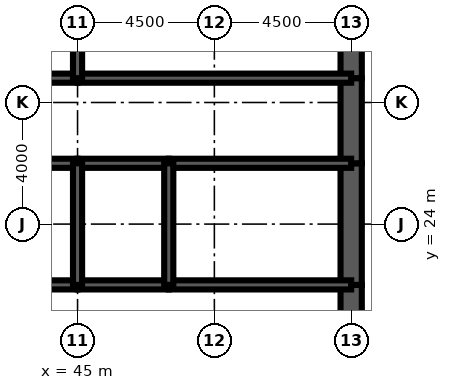
"""IFC4 building model, lengths in metres.
Left out: names, types, materials, properties, quantities, classifications, styles, units other than length and angle.
Written with IfcOpenShell. Run it as: python <this file> out.ifc"""

import sys

from ifc_helpers import new_model, si_unit, direction, frame, frame_2d, origin, place, context, subcontext, project, spatial, rectangle, extrude, element, fill, save


model = new_model("IFC4")
c1 = context("Model", 3, precision=1e-05, world=origin(), true_north=direction((0.0, 1.0)))
c2 = subcontext(c1, "Body", "Model", "MODEL_VIEW")
j1 = project(units=[si_unit("LENGTHUNIT", "METRE"), si_unit("PLANEANGLEUNIT", "RADIAN")], contexts=[c1])
p1 = place(None, origin())
s1 = spatial("IfcSite", under=j1, at=p1, CompositionType="ELEMENT")
p2 = place(p1, origin())
s2 = spatial("IfcBuilding", under=s1, at=p2, CompositionType="ELEMENT")
p3 = place(p2, frame((0.0, 0.0, 287.9)))
s3 = spatial("IfcBuildingStorey", under=s2, at=p3, CompositionType="ELEMENT", Elevation=287.9)
p4 = place(p3, frame((54.0, 19.2, 0.0), z_axis=(0.0, 0.0, 1.0), x_axis=(0.0, 1.0, 0.0)))
e1 = element("IfcWall", 1, at=p4, inside=s3, PredefinedType="SHEAR", context=c2, shape_type="SweptSolid", body=[
    extrude(rectangle(XDim=2.8, YDim=0.7, at=frame_2d((1.4, 0.0))), origin(), (0.0, 0.0, 1.0), 4.2),
])
p5 = place(p4, frame((0.4, 0.0, 0.0)))
e2 = element("IfcOpeningElement", 2, at=p5, cuts=e1, PredefinedType="OPENING", context=c2, shape_type="SweptSolid", body=[
    extrude(rectangle(XDim=1.8, YDim=2.1, at=frame_2d((0.9, 1.05))), frame((0.0, 0.36, 0.0), z_axis=(0.0, -1.0, 0.0), x_axis=(1.0, 0.0, 0.0)), (0.0, 0.0, 1.0), 0.72),
])
p6 = place(p3, frame((54.0, 22.0, 0.0), z_axis=(0.0, 0.0, 1.0), x_axis=(0.0, 1.0, 0.0)))
e3 = element("IfcWall", 3, at=p6, inside=s3, PredefinedType="SHEAR", context=c2, shape_type="SweptSolid", body=[
    extrude(rectangle(XDim=4.0, YDim=0.7, at=frame_2d((2.0, 0.0))), origin(), (0.0, 0.0, 1.0), 4.2),
])
p7 = place(p3, frame((54.0, 26.0, 0.0), z_axis=(0.0, 0.0, 1.0), x_axis=(0.0, 1.0, 0.0)))
e4 = element("IfcWall", 4, at=p7, inside=s3, PredefinedType="SHEAR", context=c2, shape_type="SweptSolid", body=[
    extrude(rectangle(XDim=2.8, YDim=0.7, at=frame_2d((1.4, 0.0))), origin(), (0.0, 0.0, 1.0), 4.2),
])
p8 = place(p7, frame((0.6, 0.0, 0.0)))
e5 = element("IfcOpeningElement", 5, at=p8, cuts=e4, PredefinedType="OPENING", context=c2, shape_type="SweptSolid", body=[
    extrude(rectangle(XDim=1.8, YDim=2.1, at=frame_2d((0.9, 1.05))), frame((0.0, 0.36, 0.0), z_axis=(0.0, -1.0, 0.0), x_axis=(1.0, 0.0, 0.0)), (0.0, 0.0, 1.0), 0.72),
])
p9 = place(p3, frame((54.0, 28.8, 0.0), z_axis=(0.0, 0.0, 1.0), x_axis=(0.0, 1.0, 0.0)))
e6 = element("IfcWall", 6, at=p9, inside=s3, PredefinedType="SHEAR", context=c2, shape_type="SweptSolid", body=[
    extrude(rectangle(XDim=3.2, YDim=0.7, at=frame_2d((1.6, 0.0))), origin(), (0.0, 0.0, 1.0), 4.2),
])
p10 = place(p3, frame((42.0, 28.8, 0.0), z_axis=(0.0, 0.0, 1.0), x_axis=(1.0, 0.0, 0.0)))
e7 = element("IfcWall", 7, at=p10, inside=s3, PredefinedType="SOLIDWALL", context=c2, shape_type="SweptSolid", body=[
    extrude(rectangle(XDim=3.0, YDim=0.3, at=frame_2d((1.5, 0.0))), origin(), (0.0, 0.0, 1.0), 4.2),
])
p11 = place(p10, frame((0.95, 0.0, 0.0)))
e8 = element("IfcOpeningElement", 8, at=p11, cuts=e7, PredefinedType="OPENING", context=c2, shape_type="SweptSolid", body=[
    extrude(rectangle(XDim=1.1, YDim=2.2, at=frame_2d((0.55, 1.1))), frame((0.0, 0.16, 0.0), z_axis=(0.0, -1.0, 0.0), x_axis=(1.0, 0.0, 0.0)), (0.0, 0.0, 1.0), 0.32),
])
p12 = place(p3, frame((45.0, 28.8, 0.0), z_axis=(0.0, 0.0, 1.0), x_axis=(1.0, 0.0, 0.0)))
e9 = element("IfcWall", 9, at=p12, inside=s3, PredefinedType="SOLIDWALL", context=c2, shape_type="SweptSolid", body=[
    extrude(rectangle(XDim=9.0, YDim=0.3, at=frame_2d((4.5, 0.0))), origin(), (0.0, 0.0, 1.0), 4.2),
])
p13 = place(p12, frame((7.35, 0.0, 0.0)))
e10 = element("IfcOpeningElement", 10, at=p13, cuts=e9, PredefinedType="OPENING", context=c2, shape_type="SweptSolid", body=[
    extrude(rectangle(XDim=1.0, YDim=2.1, at=frame_2d((0.5, 1.05))), frame((0.0, 0.16, 0.0), z_axis=(0.0, -1.0, 0.0), x_axis=(1.0, 0.0, 0.0)), (0.0, 0.0, 1.0), 0.32),
])
p14 = place(p3, frame((36.0, 22.0, 0.0), z_axis=(0.0, 0.0, 1.0), x_axis=(1.0, 0.0, 0.0)))
e11 = element("IfcWall", 11, at=p14, inside=s3, PredefinedType="SOLIDWALL", context=c2, shape_type="SweptSolid", body=[
    extrude(rectangle(XDim=9.0, YDim=0.3, at=frame_2d((4.5, 0.0))), origin(), (0.0, 0.0, 1.0), 4.2),
])
p15 = place(p14, frame((4.0, 0.0, 0.0)))
e12 = element("IfcOpeningElement", 12, at=p15, cuts=e11, PredefinedType="OPENING", context=c2, shape_type="SweptSolid", body=[
    extrude(rectangle(XDim=1.0, YDim=2.1, at=frame_2d((0.5, 1.05))), frame((0.0, 0.16, 0.0), z_axis=(0.0, -1.0, 0.0), x_axis=(1.0, 0.0, 0.0)), (0.0, 0.0, 1.0), 0.32),
])
p16 = place(p3, frame((45.0, 22.0, 0.0), z_axis=(0.0, 0.0, 1.0), x_axis=(1.0, 0.0, 0.0)))
e13 = element("IfcWall", 13, at=p16, inside=s3, PredefinedType="SOLIDWALL", context=c2, shape_type="SweptSolid", body=[
    extrude(rectangle(XDim=3.0, YDim=0.3, at=frame_2d((1.5, 0.0))), origin(), (0.0, 0.0, 1.0), 4.2),
])
p17 = place(p16, frame((1.0, 0.0, 0.0)))
e14 = element("IfcOpeningElement", 14, at=p17, cuts=e13, PredefinedType="OPENING", context=c2, shape_type="SweptSolid", body=[
    extrude(rectangle(XDim=1.0, YDim=2.1, at=frame_2d((0.5, 1.05))), frame((0.0, 0.16, 0.0), z_axis=(0.0, -1.0, 0.0), x_axis=(1.0, 0.0, 0.0)), (0.0, 0.0, 1.0), 0.32),
])
p18 = place(p3, frame((48.0, 22.0, 0.0), z_axis=(0.0, 0.0, 1.0), x_axis=(1.0, 0.0, 0.0)))
e15 = element("IfcWall", 15, at=p18, inside=s3, PredefinedType="SOLIDWALL", context=c2, shape_type="SweptSolid", body=[
    extrude(rectangle(XDim=6.0, YDim=0.3, at=frame_2d((3.0, 0.0))), origin(), (0.0, 0.0, 1.0), 4.2),
])
p19 = place(p18, frame((2.0, 0.0, 0.0)))
e16 = element("IfcOpeningElement", 16, at=p19, cuts=e15, PredefinedType="OPENING", context=c2, shape_type="SweptSolid", body=[
    extrude(rectangle(XDim=1.0, YDim=2.1, at=frame_2d((0.5, 1.05))), frame((0.0, 0.16, 0.0), z_axis=(0.0, -1.0, 0.0), x_axis=(1.0, 0.0, 0.0)), (0.0, 0.0, 1.0), 0.32),
])
p20 = place(p3, frame((36.0, 26.0, 0.0), z_axis=(0.0, 0.0, 1.0), x_axis=(1.0, 0.0, 0.0)))
e17 = element("IfcWall", 17, at=p20, inside=s3, PredefinedType="SOLIDWALL", context=c2, shape_type="SweptSolid", body=[
    extrude(rectangle(XDim=9.0, YDim=0.3, at=frame_2d((4.5, 0.0))), origin(), (0.0, 0.0, 1.0), 4.2),
])
p21 = place(p3, frame((45.0, 26.0, 0.0), z_axis=(0.0, 0.0, 1.0), x_axis=(1.0, 0.0, 0.0)))
e18 = element("IfcWall", 18, at=p21, inside=s3, PredefinedType="SOLIDWALL", context=c2, shape_type="SweptSolid", body=[
    extrude(rectangle(XDim=3.0, YDim=0.3, at=frame_2d((1.5, 0.0))), origin(), (0.0, 0.0, 1.0), 4.2),
])
p22 = place(p3, frame((48.0, 26.0, 0.0), z_axis=(0.0, 0.0, 1.0), x_axis=(1.0, 0.0, 0.0)))
e19 = element("IfcWall", 19, at=p22, inside=s3, PredefinedType="SOLIDWALL", context=c2, shape_type="SweptSolid", body=[
    extrude(rectangle(XDim=6.0, YDim=0.3, at=frame_2d((3.0, 0.0))), origin(), (0.0, 0.0, 1.0), 4.2),
])
p23 = place(p3, frame((45.0, 28.8, 0.0), z_axis=(0.0, 0.0, 1.0), x_axis=(0.0, 1.0, 0.0)))
e20 = element("IfcWall", 20, at=p23, inside=s3, PredefinedType="SOLIDWALL", context=c2, shape_type="SweptSolid", body=[
    extrude(rectangle(XDim=3.2, YDim=0.3, at=frame_2d((1.6, 0.0))), origin(), (0.0, 0.0, 1.0), 4.2),
])
for number, where, z_axis, x_axis in (
    (21, (45.0, 22.0, 0.0), (0.0, 0.0, 1.0), (0.0, 1.0, 0.0)),
    (22, (48.0, 22.0, 0.0), (0.0, 0.0, 1.0), (0.0, 1.0, 0.0)),
):
    element("IfcWall", number, at=place(p3, frame(where, z_axis=z_axis, x_axis=x_axis)), inside=s3, PredefinedType="SOLIDWALL", context=c2, shape_type="SweptSolid", body=[
        extrude(rectangle(XDim=4.0, YDim=0.3, at=frame_2d((2.0, 0.0))), origin(), (0.0, 0.0, 1.0), 4.2),
    ])
p24 = place(p3, frame((46.2, 26.15, 0.0), z_axis=(0.0, 0.0, 1.0), x_axis=(0.0, 1.0, 0.0)))
e23 = element("IfcWall", 23, at=p24, inside=s3, PredefinedType="PARTITIONING", context=c2, shape_type="SweptSolid", body=[
    extrude(rectangle(XDim=2.5, YDim=0.15, at=frame_2d((1.25, 0.0))), origin(), (0.0, 0.0, 1.0), 3.0),
])
p25 = place(p24, frame((1.15, 0.0, 0.0)))
e24 = element("IfcOpeningElement", 24, at=p25, cuts=e23, PredefinedType="OPENING", context=c2, shape_type="SweptSolid", body=[
    extrude(rectangle(XDim=1.0, YDim=2.1, at=frame_2d((0.5, 1.05))), frame((0.0, 0.085, 0.0), z_axis=(0.0, -1.0, 0.0), x_axis=(1.0, 0.0, 0.0)), (0.0, 0.0, 1.0), 0.17),
])
p26 = place(p25, origin())
e25 = element("IfcDoor", 25, at=p26, inside=s3, OperationType="SINGLE_SWING_RIGHT", PredefinedType="DOOR", context=c2, shape_type="SweptSolid", body=[
    extrude(rectangle(XDim=1.0, YDim=2.1, at=frame_2d((0.5, 1.05))), frame((0.0, 0.025, 0.0), z_axis=(0.0, -1.0, 0.0), x_axis=(1.0, 0.0, 0.0)), (0.0, 0.0, 1.0), 0.05),
])
fill(e24, e25)
p27 = place(p13, origin())
e26 = element("IfcDoor", 26, at=p27, inside=s3, OperationType="SINGLE_SWING_RIGHT", PredefinedType="DOOR", context=c2, shape_type="SweptSolid", body=[
    extrude(rectangle(XDim=1.0, YDim=2.1, at=frame_2d((0.5, 1.05))), frame((0.0, 0.025, 0.0), z_axis=(0.0, -1.0, 0.0), x_axis=(1.0, 0.0, 0.0)), (0.0, 0.0, 1.0), 0.05),
])
fill(e10, e26)
p28 = place(p5, origin())
e27 = element("IfcDoor", 27, at=p28, inside=s3, OperationType="SINGLE_SWING_LEFT", PredefinedType="DOOR", context=c2, shape_type="SweptSolid", body=[
    extrude(rectangle(XDim=1.8, YDim=2.1, at=frame_2d((0.9, 1.05))), frame((0.0, 0.35, 0.0), z_axis=(0.0, -1.0, 0.0), x_axis=(1.0, 0.0, 0.0)), (0.0, 0.0, 1.0), 0.699),
])
fill(e2, e27)
p29 = place(p8, origin())
e28 = element("IfcDoor", 28, at=p29, inside=s3, OperationType="SINGLE_SWING_LEFT", PredefinedType="DOOR", context=c2, shape_type="SweptSolid", body=[
    extrude(rectangle(XDim=1.8, YDim=2.1, at=frame_2d((0.9, 1.05))), frame((0.0, 0.35, 0.0), z_axis=(0.0, -1.0, 0.0), x_axis=(1.0, 0.0, 0.0)), (0.0, 0.0, 1.0), 0.699),
])
fill(e5, e28)
p30 = place(p17, origin())
e29 = element("IfcDoor", 29, at=p30, inside=s3, OperationType="SINGLE_SWING_LEFT", PredefinedType="DOOR", context=c2, shape_type="SweptSolid", body=[
    extrude(rectangle(XDim=1.0, YDim=2.1, at=frame_2d((0.5, 1.05))), frame((0.0, 0.025, 0.0), z_axis=(0.0, -1.0, 0.0), x_axis=(1.0, 0.0, 0.0)), (0.0, 0.0, 1.0), 0.05),
])
fill(e14, e29)
p31 = place(p19, origin())
e30 = element("IfcDoor", 30, at=p31, inside=s3, OperationType="SINGLE_SWING_LEFT", PredefinedType="DOOR", context=c2, shape_type="SweptSolid", body=[
    extrude(rectangle(XDim=1.0, YDim=2.1, at=frame_2d((0.5, 1.05))), frame((0.0, 0.025, 0.0), z_axis=(0.0, -1.0, 0.0), x_axis=(1.0, 0.0, 0.0)), (0.0, 0.0, 1.0), 0.05),
])
fill(e16, e30)
save(model, sys.argv[1])
